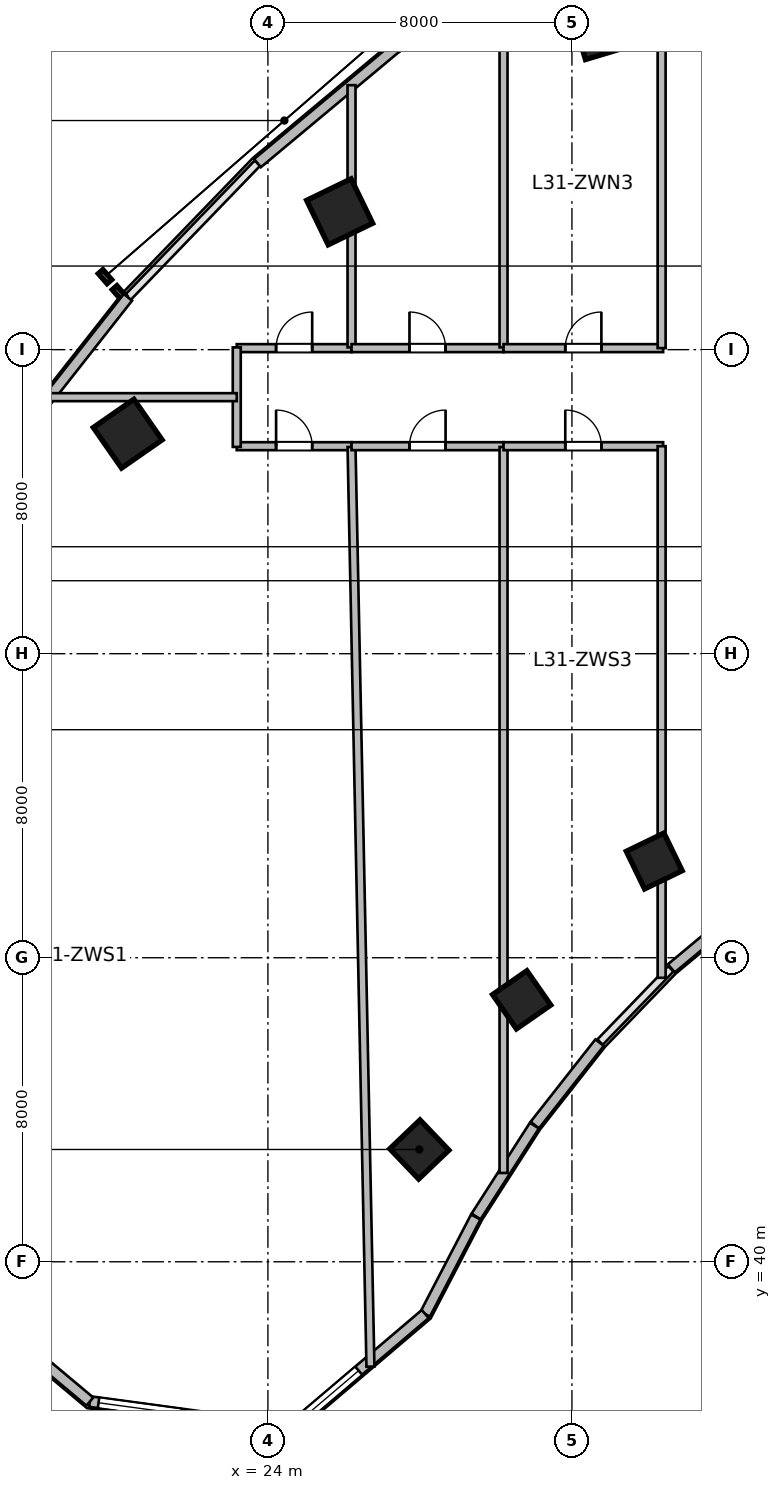
"""IFC4 building model, lengths in metres.
Left out: names, types, materials, properties, quantities, classifications, styles, units other than length and angle.
Written with IfcOpenShell. Run it as: python <this file> out.ifc"""

import sys

from ifc_helpers import new_model, si_unit, direction, frame, frame_2d, origin, origin_2d, place, context, subcontext, project, spatial, rectangle, extrude, source, transform, mapped, element, fill, save


model = new_model("IFC4")
c1 = context("Model", 3, precision=1e-05, world=origin(), true_north=direction((0.0, 1.0)))
c2 = subcontext(c1, "Body", "Model", "MODEL_VIEW")
j1 = project(units=[si_unit("LENGTHUNIT", "METRE"), si_unit("PLANEANGLEUNIT", "RADIAN")], contexts=[c1])
p1 = place(None, origin())
s1 = spatial("IfcSite", under=j1, at=p1, CompositionType="ELEMENT")
p2 = place(p1, origin())
s2 = spatial("IfcBuilding", under=s1, at=p2, CompositionType="ELEMENT")
p3 = place(p2, frame((0.0, 0.0, 131.1)))
s3 = spatial("IfcBuildingStorey", under=s2, at=p3, CompositionType="ELEMENT", Elevation=131.1)
m1 = source(origin(), c2, "Body", "SweptSolid", [
    extrude(rectangle(XDim=1.1, YDim=1.1, at=origin_2d()), origin(), (0.0, 0.0, 1.0), 3.9),
])
for number, where, z_axis, x_axis in (
    (1, (27.985, 42.955, 0.0), (0.0, 0.0, 1.0), (-0.691, 0.723, 0.0)),
    (2, (30.677, 46.892, 0.0), (0.0, 0.0, 1.0), (-0.571, 0.821, 0.0)),
):
    element("IfcColumn", number, at=place(p3, frame(where, z_axis=z_axis, x_axis=x_axis)), inside=s3, PredefinedType="COLUMN", context=c2, shape_type="MappedRepresentation", body=[
        mapped(m1, transform((0.0, 0.0, 0.0), scale=1.0)),
    ])
m2 = source(origin(), c2, "Body", "SweptSolid", [
    extrude(rectangle(XDim=1.3, YDim=1.3, at=origin_2d()), origin(), (0.0, 0.0, 1.0), 3.9),
])
p4 = place(p3, frame((20.311, 61.789, 0.0), z_axis=(0.0, 0.0, 1.0), x_axis=(-0.571143442153, 0.820850271661, 0.0)))
e3 = element("IfcColumn", 3, at=p4, inside=s3, PredefinedType="COLUMN", context=c2, shape_type="MappedRepresentation", body=[
    mapped(m2, transform((0.0, 0.0, 0.0), scale=1.0)),
])
p5 = place(p3, frame((34.166, 50.545, 0.0), z_axis=(0.0, 0.0, 1.0), x_axis=(-0.436173672171, 0.899862504889, 0.0)))
e4 = element("IfcColumn", 4, at=p5, inside=s3, PredefinedType="COLUMN", context=c2, shape_type="MappedRepresentation", body=[
    mapped(m1, transform((0.0, 0.0, 0.0), scale=1.0)),
])
for number, where, z_axis, x_axis in (
    (5, (25.888, 67.627, 0.0), (0.0, 0.0, 1.0), (-0.436, 0.9, 0.0)),
    (6, (32.791, 72.442, 0.0), (0.0, 0.0, 1.0), (-0.289, 0.957, 0.0)),
):
    element("IfcColumn", number, at=place(p3, frame(where, z_axis=z_axis, x_axis=x_axis)), inside=s3, PredefinedType="COLUMN", context=c2, shape_type="MappedRepresentation", body=[
        mapped(m2, transform((0.0, 0.0, 0.0), scale=1.0)),
    ])
m3 = source(origin(), c2, "Body", "SweptSolid", [
    extrude(rectangle(XDim=2.601, YDim=0.28, at=frame_2d((1.3, 0.0))), origin(), (0.0, 0.0, 1.0), 3.65),
])
p6 = place(p3, frame((36.613, 49.387, 0.0), z_axis=(0.0, 0.0, 1.0), x_axis=(-0.76796730295, -0.640489048775, 0.0)))
e7 = element("IfcWall", 7, at=p6, inside=s3, PredefinedType="SOLIDWALL", context=c2, shape_type="MappedRepresentation", body=[
    mapped(m3, transform((0.0, 0.0, 0.0), scale=1.0)),
])
m4 = source(origin(), c2, "Body", "SweptSolid", [
    extrude(rectangle(XDim=2.76, YDim=0.28, at=frame_2d((1.38, 0.0))), origin(), (0.0, 0.0, 1.0), 3.65),
])
p7 = place(p3, frame((32.728, 45.766, 0.0), z_axis=(0.0, 0.0, 1.0), x_axis=(-0.618180818641, -0.786035925047, 0.0)))
e8 = element("IfcWall", 8, at=p7, inside=s3, PredefinedType="SOLIDWALL", context=c2, shape_type="MappedRepresentation", body=[
    mapped(m4, transform((0.0, 0.0, 0.0), scale=1.0)),
])
m5 = source(origin(), c2, "Body", "SweptSolid", [
    extrude(rectangle(XDim=2.84, YDim=0.28, at=frame_2d((1.42, 0.0))), origin(), (0.0, 0.0, 1.0), 3.65),
])
p8 = place(p3, frame((31.011, 43.582, 0.0), z_axis=(0.0, 0.0, 1.0), x_axis=(-0.540214368057, -0.841527442538, 0.0)))
e9 = element("IfcWall", 9, at=p8, inside=s3, PredefinedType="SOLIDWALL", context=c2, shape_type="MappedRepresentation", body=[
    mapped(m5, transform((0.0, 0.0, 0.0), scale=1.0)),
])
m6 = source(origin(), c2, "Body", "SweptSolid", [
    extrude(rectangle(XDim=2.88, YDim=0.28, at=frame_2d((1.44, 0.0))), origin(), (0.0, 0.0, 1.0), 3.65),
])
p9 = place(p3, frame((29.469, 41.178, 0.0), z_axis=(0.0, 0.0, 1.0), x_axis=(-0.461769086658, -0.887000175088, 0.0)))
e10 = element("IfcWall", 10, at=p9, inside=s3, PredefinedType="SOLIDWALL", context=c2, shape_type="MappedRepresentation", body=[
    mapped(m6, transform((0.0, 0.0, 0.0), scale=1.0)),
])
m7 = source(origin(), c2, "Body", "SweptSolid", [
    extrude(rectangle(XDim=4.659, YDim=0.28, at=frame_2d((2.33, 0.0))), origin(), (0.0, 0.0, 1.0), 3.65),
])
p10 = place(p3, frame((28.139, 38.624, 0.0), z_axis=(0.0, 0.0, 1.0), x_axis=(-0.761913458795, -0.647678841176, 0.0)))
e11 = element("IfcWall", 11, at=p10, inside=s3, PredefinedType="SOLIDWALL", context=c2, shape_type="MappedRepresentation", body=[
    mapped(m7, transform((0.0, 0.0, 0.0), scale=1.0)),
])
p11 = place(p10, frame((2.299, 0.0, 0.95)))
e12 = element("IfcOpeningElement", 12, at=p11, cuts=e11, PredefinedType="OPENING", context=c2, shape_type="SweptSolid", body=[
    extrude(rectangle(XDim=2.2, YDim=2.1, at=frame_2d((1.1, 1.05))), frame((0.0, 0.15, 0.0), z_axis=(0.0, -1.0, 0.0), x_axis=(1.0, 0.0, 0.0)), (0.0, 0.0, 1.0), 0.3),
])
m8 = source(origin(), c2, "Body", "SweptSolid", [
    extrude(rectangle(XDim=5.324, YDim=0.28, at=frame_2d((2.662, 0.0))), origin(), (0.0, 0.0, 1.0), 3.65),
])
p12 = place(p3, frame((24.59, 35.606, 0.0), z_axis=(0.0, 0.0, 1.0), x_axis=(-0.990931467223, 0.134368252451, 0.0)))
e13 = element("IfcWall", 13, at=p12, inside=s3, PredefinedType="SOLIDWALL", context=c2, shape_type="MappedRepresentation", body=[
    mapped(m8, transform((0.0, 0.0, 0.0), scale=1.0)),
])
p13 = place(p12, frame((2.893, 0.0, 0.95)))
e14 = element("IfcOpeningElement", 14, at=p13, cuts=e13, PredefinedType="OPENING", context=c2, shape_type="SweptSolid", body=[
    extrude(rectangle(XDim=2.2, YDim=2.1, at=frame_2d((1.1, 1.05))), frame((0.0, 0.15, 0.0), z_axis=(0.0, -1.0, 0.0), x_axis=(1.0, 0.0, 0.0)), (0.0, 0.0, 1.0), 0.3),
])
m9 = source(origin(), c2, "Body", "SweptSolid", [
    extrude(rectangle(XDim=6.573, YDim=0.28, at=frame_2d((3.287, 0.0))), origin(), (0.0, 0.0, 1.0), 3.65),
])
p14 = place(p3, frame((19.314, 36.322, 0.0), z_axis=(0.0, 0.0, 1.0), x_axis=(-0.766715154163, 0.641987439423, 0.0)))
e15 = element("IfcWall", 15, at=p14, inside=s3, PredefinedType="SOLIDWALL", context=c2, shape_type="MappedRepresentation", body=[
    mapped(m9, transform((0.0, 0.0, 0.0), scale=1.0)),
])
p15 = place(p14, frame((3.83, 0.0, 0.95)))
e16 = element("IfcOpeningElement", 16, at=p15, cuts=e15, PredefinedType="OPENING", context=c2, shape_type="SweptSolid", body=[
    extrude(rectangle(XDim=2.2, YDim=2.1, at=frame_2d((1.1, 1.05))), frame((0.0, 0.15, 0.0), z_axis=(0.0, -1.0, 0.0), x_axis=(1.0, 0.0, 0.0)), (0.0, 0.0, 1.0), 0.3),
])
m10 = source(origin(), c2, "Body", "SweptSolid", [
    extrude(rectangle(XDim=5.058, YDim=0.28, at=frame_2d((2.529, 0.0))), origin(), (0.0, 0.0, 1.0), 3.65),
])
p16 = place(p3, frame((17.188, 61.4, 0.0), z_axis=(0.0, 0.0, 1.0), x_axis=(0.618145507434, 0.786063694391, 0.0)))
e17 = element("IfcWall", 17, at=p16, inside=s3, PredefinedType="SOLIDWALL", context=c2, shape_type="MappedRepresentation", body=[
    mapped(m10, transform((0.0, 0.0, 0.0), scale=1.0)),
])
m11 = source(origin(), c2, "Body", "SweptSolid", [
    extrude(rectangle(XDim=4.762, YDim=0.28, at=frame_2d((2.381, 0.0))), origin(), (0.0, 0.0, 1.0), 3.65),
])
p17 = place(p3, frame((23.725, 68.907, 0.0), z_axis=(0.0, 0.0, 1.0), x_axis=(0.767952279762, 0.640507061638, 0.0)))
e18 = element("IfcWall", 18, at=p17, inside=s3, PredefinedType="SOLIDWALL", context=c2, shape_type="MappedRepresentation", body=[
    mapped(m11, transform((0.0, 0.0, 0.0), scale=1.0)),
])
m12 = source(origin(), c2, "Body", "SweptSolid", [
    extrude(rectangle(XDim=3.02, YDim=0.21, at=frame_2d((1.51, 0.0))), origin(), (0.0, 0.0, 1.0), 3.65),
])
p18 = place(p3, frame((23.18, 64.04, 0.0), z_axis=(0.0, 0.0, 1.0), x_axis=(1.0, 0.0, 0.0)))
e19 = element("IfcWall", 19, at=p18, inside=s3, PredefinedType="PARTITIONING", context=c2, shape_type="MappedRepresentation", body=[
    mapped(m12, transform((0.0, 0.0, 0.0), scale=1.0)),
])
p19 = place(p18, frame((1.035, 0.0, 0.0)))
e20 = element("IfcOpeningElement", 20, at=p19, cuts=e19, PredefinedType="OPENING", context=c2, shape_type="SweptSolid", body=[
    extrude(rectangle(XDim=0.95, YDim=2.1, at=frame_2d((0.475, 1.05))), frame((0.0, 0.115, 0.0), z_axis=(0.0, -1.0, 0.0), x_axis=(1.0, 0.0, 0.0)), (0.0, 0.0, 1.0), 0.23),
])
m13 = source(origin(), c2, "Body", "SweptSolid", [
    extrude(rectangle(XDim=6.899, YDim=0.21, at=frame_2d((3.449, 0.0))), origin(), (0.0, 0.0, 1.0), 2.942),
])
p20 = place(p3, frame((26.2, 64.06, 0.0), z_axis=(0.0, 0.0, 1.0), x_axis=(0.0, 1.0, 0.0)))
e21 = element("IfcWall", 21, at=p20, inside=s3, PredefinedType="PARTITIONING", context=c2, shape_type="MappedRepresentation", body=[
    mapped(m13, transform((0.0, 0.0, 0.0), scale=1.0)),
])
m14 = source(origin(), c2, "Body", "SweptSolid", [
    extrude(rectangle(XDim=4.0, YDim=0.21, at=frame_2d((2.0, 0.0))), origin(), (0.0, 0.0, 1.0), 3.65),
])
p21 = place(p3, frame((26.2, 64.04, 0.0), z_axis=(0.0, 0.0, 1.0), x_axis=(1.0, 0.0, 0.0)))
e22 = element("IfcWall", 22, at=p21, inside=s3, PredefinedType="PARTITIONING", context=c2, shape_type="MappedRepresentation", body=[
    mapped(m14, transform((0.0, 0.0, 0.0), scale=1.0)),
])
p22 = place(p21, frame((1.525, 0.0, 0.0)))
e23 = element("IfcOpeningElement", 23, at=p22, cuts=e22, PredefinedType="OPENING", context=c2, shape_type="SweptSolid", body=[
    extrude(rectangle(XDim=0.95, YDim=2.1, at=frame_2d((0.475, 1.05))), frame((0.0, 0.115, 0.0), z_axis=(0.0, -1.0, 0.0), x_axis=(1.0, 0.0, 0.0)), (0.0, 0.0, 1.0), 0.23),
])
m15 = source(origin(), c2, "Body", "SweptSolid", [
    extrude(rectangle(XDim=9.736, YDim=0.21, at=frame_2d((4.868, 0.0))), origin(), (0.0, 0.0, 1.0), 3.65),
])
p23 = place(p3, frame((30.2, 64.06, 0.0), z_axis=(0.0, 0.0, 1.0), x_axis=(0.0, 1.0, 0.0)))
e24 = element("IfcWall", 24, at=p23, inside=s3, PredefinedType="PARTITIONING", context=c2, shape_type="MappedRepresentation", body=[
    mapped(m15, transform((0.0, 0.0, 0.0), scale=1.0)),
])
m16 = source(origin(), c2, "Body", "SweptSolid", [
    extrude(rectangle(XDim=4.2, YDim=0.21, at=frame_2d((2.1, 0.0))), origin(), (0.0, 0.0, 1.0), 3.65),
])
p24 = place(p3, frame((30.2, 64.04, 0.0), z_axis=(0.0, 0.0, 1.0), x_axis=(1.0, 0.0, 0.0)))
e25 = element("IfcWall", 25, at=p24, inside=s3, PredefinedType="PARTITIONING", context=c2, shape_type="MappedRepresentation", body=[
    mapped(m16, transform((0.0, 0.0, 0.0), scale=1.0)),
])
p25 = place(p24, frame((1.625, 0.0, 0.0)))
e26 = element("IfcOpeningElement", 26, at=p25, cuts=e25, PredefinedType="OPENING", context=c2, shape_type="SweptSolid", body=[
    extrude(rectangle(XDim=0.95, YDim=2.1, at=frame_2d((0.475, 1.05))), frame((0.0, 0.115, 0.0), z_axis=(0.0, -1.0, 0.0), x_axis=(1.0, 0.0, 0.0)), (0.0, 0.0, 1.0), 0.23),
])
p26 = place(p3, frame((23.18, 61.46, 0.0), z_axis=(0.0, 0.0, 1.0), x_axis=(1.0, 0.0, 0.0)))
e27 = element("IfcWall", 27, at=p26, inside=s3, PredefinedType="PARTITIONING", context=c2, shape_type="MappedRepresentation", body=[
    mapped(m12, transform((0.0, 0.0, 0.0), scale=1.0)),
])
p27 = place(p26, frame((1.035, 0.0, 0.0)))
e28 = element("IfcOpeningElement", 28, at=p27, cuts=e27, PredefinedType="OPENING", context=c2, shape_type="SweptSolid", body=[
    extrude(rectangle(XDim=0.95, YDim=2.1, at=frame_2d((0.475, 1.05))), frame((0.0, 0.115, 0.0), z_axis=(0.0, -1.0, 0.0), x_axis=(1.0, 0.0, 0.0)), (0.0, 0.0, 1.0), 0.23),
])
m17 = source(origin(), c2, "Body", "SweptSolid", [
    extrude(rectangle(XDim=24.204, YDim=0.21, at=frame_2d((12.102, 0.0))), origin(), (0.0, 0.0, 1.0), 2.942),
])
p28 = place(p3, frame((26.698, 37.241, 0.0), z_axis=(0.0, 0.0, 1.0), x_axis=(-0.020566881318, 0.999788479326, 0.0)))
e29 = element("IfcWall", 29, at=p28, inside=s3, PredefinedType="PARTITIONING", context=c2, shape_type="MappedRepresentation", body=[
    mapped(m17, transform((0.0, 0.0, 0.0), scale=1.0)),
])
p29 = place(p3, frame((26.2, 61.46, 0.0), z_axis=(0.0, 0.0, 1.0), x_axis=(1.0, 0.0, 0.0)))
e30 = element("IfcWall", 30, at=p29, inside=s3, PredefinedType="PARTITIONING", context=c2, shape_type="MappedRepresentation", body=[
    mapped(m14, transform((0.0, 0.0, 0.0), scale=1.0)),
])
p30 = place(p29, frame((1.525, 0.0, 0.0)))
e31 = element("IfcOpeningElement", 31, at=p30, cuts=e30, PredefinedType="OPENING", context=c2, shape_type="SweptSolid", body=[
    extrude(rectangle(XDim=0.95, YDim=2.1, at=frame_2d((0.475, 1.05))), frame((0.0, 0.115, 0.0), z_axis=(0.0, -1.0, 0.0), x_axis=(1.0, 0.0, 0.0)), (0.0, 0.0, 1.0), 0.23),
])
m18 = source(origin(), c2, "Body", "SweptSolid", [
    extrude(rectangle(XDim=19.103, YDim=0.21, at=frame_2d((9.552, 0.0))), origin(), (0.0, 0.0, 1.0), 2.942),
])
p31 = place(p3, frame((30.2, 42.337, 0.0), z_axis=(0.0, 0.0, 1.0), x_axis=(0.0, 1.0, 0.0)))
e32 = element("IfcWall", 32, at=p31, inside=s3, PredefinedType="PARTITIONING", context=c2, shape_type="MappedRepresentation", body=[
    mapped(m18, transform((0.0, 0.0, 0.0), scale=1.0)),
])
p32 = place(p3, frame((30.2, 61.46, 0.0), z_axis=(0.0, 0.0, 1.0), x_axis=(1.0, 0.0, 0.0)))
e33 = element("IfcWall", 33, at=p32, inside=s3, PredefinedType="PARTITIONING", context=c2, shape_type="MappedRepresentation", body=[
    mapped(m16, transform((0.0, 0.0, 0.0), scale=1.0)),
])
p33 = place(p32, frame((1.625, 0.0, 0.0)))
e34 = element("IfcOpeningElement", 34, at=p33, cuts=e33, PredefinedType="OPENING", context=c2, shape_type="SweptSolid", body=[
    extrude(rectangle(XDim=0.95, YDim=2.1, at=frame_2d((0.475, 1.05))), frame((0.0, 0.115, 0.0), z_axis=(0.0, -1.0, 0.0), x_axis=(1.0, 0.0, 0.0)), (0.0, 0.0, 1.0), 0.23),
])
m19 = source(origin(), c2, "Body", "SweptSolid", [
    extrude(rectangle(XDim=13.988, YDim=0.21, at=frame_2d((6.994, 0.0))), origin(), (0.0, 0.0, 1.0), 3.65),
])
p34 = place(p3, frame((34.36, 47.472, 0.0), z_axis=(0.0, 0.0, 1.0), x_axis=(0.0, 1.0, 0.0)))
e35 = element("IfcWall", 35, at=p34, inside=s3, PredefinedType="PARTITIONING", context=c2, shape_type="MappedRepresentation", body=[
    mapped(m19, transform((0.0, 0.0, 0.0), scale=1.0)),
])
m20 = source(origin(), c2, "Body", "SweptSolid", [
    extrude(rectangle(XDim=11.987, YDim=0.21, at=frame_2d((5.994, 0.0))), origin(), (0.0, 0.0, 1.0), 3.65),
])
p35 = place(p3, frame((34.36, 64.04, 0.0), z_axis=(0.0, 0.0, 1.0), x_axis=(0.0, 1.0, 0.0)))
e36 = element("IfcWall", 36, at=p35, inside=s3, PredefinedType="PARTITIONING", context=c2, shape_type="MappedRepresentation", body=[
    mapped(m20, transform((0.0, 0.0, 0.0), scale=1.0)),
])
m21 = source(origin(), c2, "Body", "SweptSolid", [
    extrude(rectangle(XDim=2.62, YDim=0.21, at=frame_2d((1.31, 0.0))), origin(), (0.0, 0.0, 1.0), 3.65),
])
p36 = place(p3, frame((23.18, 61.44, 0.0), z_axis=(0.0, 0.0, 1.0), x_axis=(0.0, 1.0, 0.0)))
e37 = element("IfcWall", 37, at=p36, inside=s3, PredefinedType="PARTITIONING", context=c2, shape_type="MappedRepresentation", body=[
    mapped(m21, transform((0.0, 0.0, 0.0), scale=1.0)),
])
m22 = source(origin(), c2, "Body", "SweptSolid", [
    extrude(rectangle(XDim=4.917, YDim=0.21, at=frame_2d((2.459, 0.0))), origin(), (0.0, 0.0, 1.0), 3.65),
])
p37 = place(p3, frame((18.262, 62.75, 0.0), z_axis=(0.0, 0.0, 1.0), x_axis=(1.0, 0.0, 0.0)))
e38 = element("IfcWall", 38, at=p37, inside=s3, PredefinedType="PARTITIONING", context=c2, shape_type="MappedRepresentation", body=[
    mapped(m22, transform((0.0, 0.0, 0.0), scale=1.0)),
])
m23 = source(origin(), c2, "Body", "SweptSolid", [
    extrude(rectangle(XDim=2.2, YDim=2.1, at=frame_2d((1.1, 1.05))), frame((0.0, 0.03, 0.0), z_axis=(0.0, -1.0, 0.0), x_axis=(1.0, 0.0, 0.0)), (0.0, 0.0, 1.0), 0.06),
])
p38 = place(p11, origin())
e39 = element("IfcWindow", 39, at=p38, inside=s3, PartitioningType="TRIPLE_PANEL_VERTICAL", PredefinedType="WINDOW", context=c2, shape_type="MappedRepresentation", body=[
    mapped(m23, transform((0.0, 0.0, 0.0), scale=1.0)),
])
fill(e12, e39)
p39 = place(p13, origin())
e40 = element("IfcWindow", 40, at=p39, inside=s3, PartitioningType="TRIPLE_PANEL_VERTICAL", PredefinedType="WINDOW", context=c2, shape_type="MappedRepresentation", body=[
    mapped(m23, transform((0.0, 0.0, 0.0), scale=1.0)),
])
fill(e14, e40)
m24 = source(origin(), c2, "Body", "SweptSolid", [
    extrude(rectangle(XDim=0.95, YDim=2.1, at=frame_2d((0.475, 1.05))), frame((0.0, 0.025, 0.0), z_axis=(0.0, -1.0, 0.0), x_axis=(1.0, 0.0, 0.0)), (0.0, 0.0, 1.0), 0.05),
])
p40 = place(p19, origin())
e41 = element("IfcDoor", 41, at=p40, inside=s3, OperationType="SINGLE_SWING_RIGHT", PredefinedType="DOOR", context=c2, shape_type="MappedRepresentation", body=[
    mapped(m24, transform((0.0, 0.0, 0.0), scale=1.0)),
])
fill(e20, e41)
p41 = place(p22, origin())
e42 = element("IfcDoor", 42, at=p41, inside=s3, OperationType="SINGLE_SWING_LEFT", PredefinedType="DOOR", context=c2, shape_type="MappedRepresentation", body=[
    mapped(m24, transform((0.0, 0.0, 0.0), scale=1.0)),
])
fill(e23, e42)
p42 = place(p25, origin())
e43 = element("IfcDoor", 43, at=p42, inside=s3, OperationType="SINGLE_SWING_RIGHT", PredefinedType="DOOR", context=c2, shape_type="MappedRepresentation", body=[
    mapped(m24, transform((0.0, 0.0, 0.0), scale=1.0)),
])
fill(e26, e43)
p43 = place(p27, origin())
e44 = element("IfcDoor", 44, at=p43, inside=s3, OperationType="SINGLE_SWING_LEFT", PredefinedType="DOOR", context=c2, shape_type="MappedRepresentation", body=[
    mapped(m24, transform((0.0, 0.0, 0.0), scale=1.0)),
])
fill(e28, e44)
p44 = place(p30, origin())
e45 = element("IfcDoor", 45, at=p44, inside=s3, OperationType="SINGLE_SWING_RIGHT", PredefinedType="DOOR", context=c2, shape_type="MappedRepresentation", body=[
    mapped(m24, transform((0.0, 0.0, 0.0), scale=1.0)),
])
fill(e31, e45)
p45 = place(p33, origin())
e46 = element("IfcDoor", 46, at=p45, inside=s3, OperationType="SINGLE_SWING_LEFT", PredefinedType="DOOR", context=c2, shape_type="MappedRepresentation", body=[
    mapped(m24, transform((0.0, 0.0, 0.0), scale=1.0)),
])
fill(e34, e46)
save(model, sys.argv[1])
